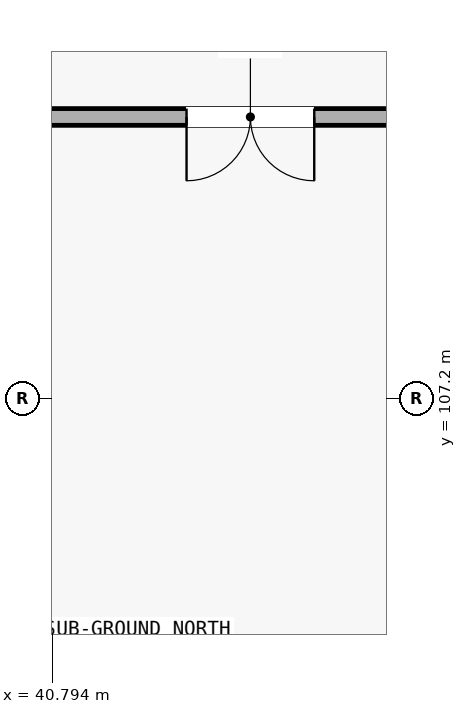
"""IFC4 building model, lengths in metres.
Left out: names, types, materials, properties, quantities, classifications, styles, units other than length and angle.
Written with IfcOpenShell. Run it as: python <this file> out.ifc"""

import sys

from ifc_helpers import new_model, si_unit, direction, frame, frame_2d, origin, place, context, subcontext, project, spatial, rectangle, extrude, element, fill, save


model = new_model("IFC4")
c1 = context("Model", 3, precision=1e-05, world=origin(), true_north=direction((0.0, 1.0)))
c2 = subcontext(c1, "Body", "Model", "MODEL_VIEW")
j1 = project(units=[si_unit("LENGTHUNIT", "METRE"), si_unit("PLANEANGLEUNIT", "RADIAN")], contexts=[c1])
p1 = place(None, origin())
s1 = spatial("IfcSite", under=j1, at=p1, CompositionType="ELEMENT")
p2 = place(p1, origin())
s2 = spatial("IfcBuilding", under=s1, at=p2, CompositionType="ELEMENT")
p3 = place(p2, frame((0.0, 0.0, -4.55)))
s3 = spatial("IfcBuildingStorey", under=s2, at=p3, CompositionType="ELEMENT", Elevation=-4.55)
p4 = place(p3, frame((29.2, 110.9, 0.0), z_axis=(0.0, 0.0, 1.0), x_axis=(1.0, 0.0, 0.0)))
e1 = element("IfcWall", 1, at=p4, inside=s3, PredefinedType="PARTITIONING", context=c2, shape_type="SweptSolid", body=[
    extrude(rectangle(XDim=28.4, YDim=0.22, at=frame_2d((14.2, 0.0))), origin(), (0.0, 0.0, 1.0), 4.28),
])
p5 = place(p4, frame((13.36, 0.0, 0.0)))
e2 = element("IfcOpeningElement", 2, at=p5, cuts=e1, PredefinedType="OPENING", context=c2, shape_type="SweptSolid", body=[
    extrude(rectangle(XDim=1.68, YDim=2.2, at=frame_2d((0.84, 1.1))), frame((0.0, 0.12, 0.0), z_axis=(0.0, -1.0, 0.0), x_axis=(1.0, 0.0, 0.0)), (0.0, 0.0, 1.0), 0.24),
])
p6 = place(p5, frame((1.68, 0.0, 0.0), z_axis=(0.0, 0.0, 1.0), x_axis=(-1.0, 0.0, 0.0)))
e3 = element("IfcDoor", 3, at=p6, inside=s3, OperationType="DOUBLE_DOOR_SINGLE_SWING", PredefinedType="DOOR", context=c2, shape_type="SweptSolid", body=[
    extrude(rectangle(XDim=1.68, YDim=2.2, at=frame_2d((0.84, 1.1))), frame((0.0, 0.025, 0.0), z_axis=(0.0, -1.0, 0.0), x_axis=(1.0, 0.0, 0.0)), (0.0, 0.0, 1.0), 0.05),
])
fill(e2, e3)
save(model, sys.argv[1])
